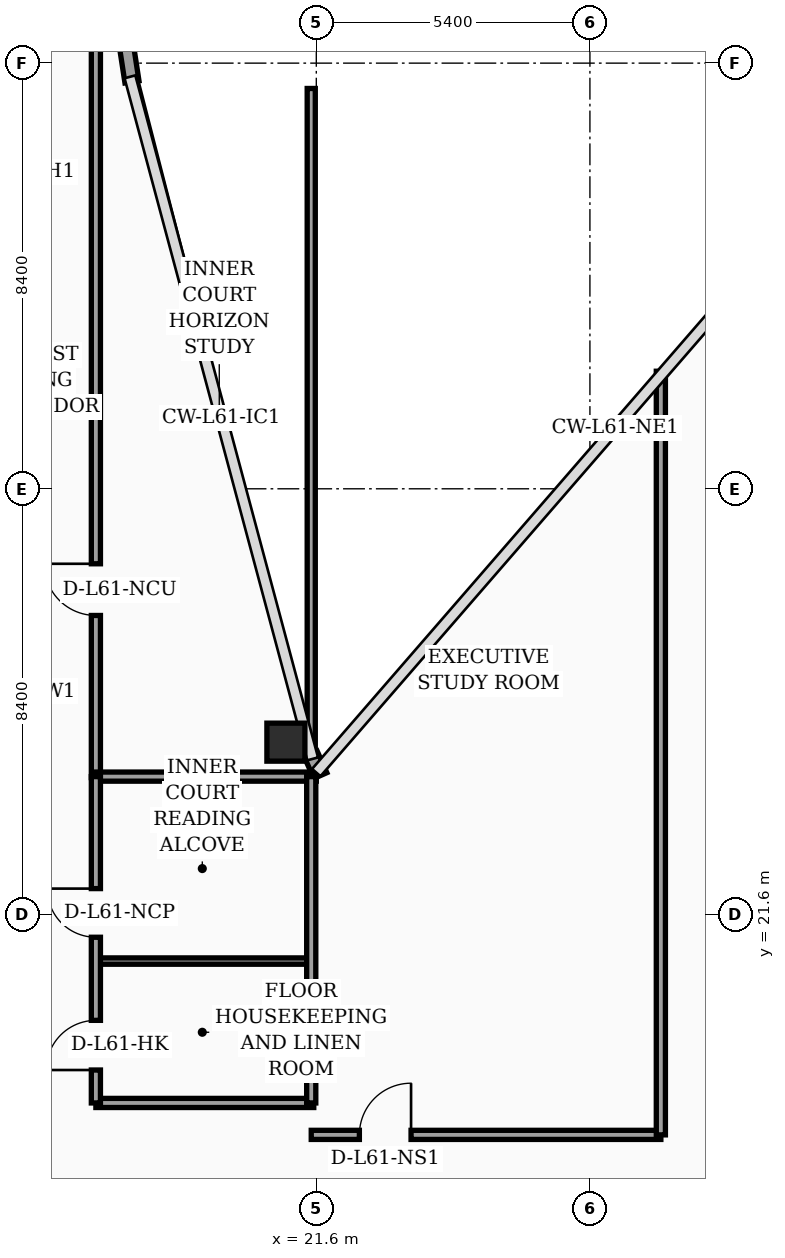
"""IFC4 building model, lengths in metres.
Left out: names, types, materials, properties, quantities, classifications, styles, units other than length and angle.
Written with IfcOpenShell. Run it as: python <this file> out.ifc"""

import sys

from ifc_helpers import new_model, si_unit, direction, frame, frame_2d, origin, origin_2d, place, context, subcontext, project, spatial, rectangle, hollow_rectangle, extrude, element, fill, save


model = new_model("IFC4")
c1 = context("Model", 3, precision=1e-05, world=origin(), true_north=direction((0.0, 1.0)))
c2 = subcontext(c1, "Body", "Model", "MODEL_VIEW")
j1 = project(units=[si_unit("LENGTHUNIT", "METRE"), si_unit("PLANEANGLEUNIT", "RADIAN")], contexts=[c1])
p1 = place(None, origin())
s1 = spatial("IfcSite", under=j1, at=p1, CompositionType="ELEMENT")
p2 = place(p1, origin())
s2 = spatial("IfcBuilding", under=s1, at=p2, CompositionType="ELEMENT")
p3 = place(p2, frame((0.0, 0.0, 247.6)))
s3 = spatial("IfcBuildingStorey", under=s2, at=p3, CompositionType="ELEMENT", Elevation=247.6)
p4 = place(p3, frame((21.0, 25.0, 0.0), z_axis=(0.0, 0.0, 1.0), x_axis=(1.0, 0.0, 0.0)))
e1 = element("IfcColumn", 1, at=p4, inside=s3, PredefinedType="COLUMN", context=c2, shape_type="SweptSolid", body=[
    extrude(hollow_rectangle(XDim=0.75, YDim=0.75, WallThickness=0.032, at=origin_2d()), origin(), (0.0, 0.0, 1.0), 3.56),
])
p5 = place(p3, frame((21.68, 24.34, 0.0), z_axis=(0.0, 0.0, 1.0), x_axis=(-0.40758134973, 0.913168901875, 0.0)))
e2 = element("IfcWall", 2, at=p5, inside=s3, PredefinedType="SOLIDWALL", context=c2, shape_type="SweptSolid", body=[
    extrude(rectangle(XDim=0.471, YDim=0.28, at=frame_2d((0.235, 0.0))), origin(), (0.0, 0.0, 1.0), 3.56),
])
p6 = place(p3, frame((17.962, 38.03, 0.0), z_axis=(0.0, 0.0, 1.0), x_axis=(-0.15141125477, 0.988470855377, 0.0)))
e3 = element("IfcWall", 3, at=p6, inside=s3, PredefinedType="SOLIDWALL", context=c2, shape_type="SweptSolid", body=[
    extrude(rectangle(XDim=0.739, YDim=0.28, at=frame_2d((0.369, 0.0))), origin(), (0.0, 0.0, 1.0), 3.56),
])
p7 = place(p3, frame((17.25, 24.3, 0.0), z_axis=(0.0, 0.0, 1.0), x_axis=(0.0, 1.0, 0.0)))
e4 = element("IfcWall", 4, at=p7, inside=s3, PredefinedType="PARTITIONING", context=c2, shape_type="SweptSolid", body=[
    extrude(rectangle(XDim=18.15, YDim=0.18, at=frame_2d((9.075, 0.0))), origin(), (0.0, 0.0, 1.0), 2.99),
])
p8 = place(p7, frame((3.2, 0.0, 0.0)))
e5 = element("IfcOpeningElement", 5, at=p8, cuts=e4, PredefinedType="OPENING", context=c2, shape_type="SweptSolid", body=[
    extrude(rectangle(XDim=1.02, YDim=2.2, at=frame_2d((0.51, 1.1))), frame((0.0, 0.1, 0.0), z_axis=(0.0, -1.0, 0.0), x_axis=(1.0, 0.0, 0.0)), (0.0, 0.0, 1.0), 0.2),
])
p9 = place(p3, frame((17.25, 17.88, 0.0), z_axis=(0.0, 0.0, 1.0), x_axis=(1.0, 0.0, 0.0)))
e6 = element("IfcWall", 6, at=p9, inside=s3, PredefinedType="PARTITIONING", context=c2, shape_type="SweptSolid", body=[
    extrude(rectangle(XDim=4.3, YDim=0.18, at=frame_2d((2.15, 0.0))), origin(), (0.0, 0.0, 1.0), 3.09),
])
p10 = place(p3, frame((17.25, 20.68, 0.0), z_axis=(0.0, 0.0, 1.0), x_axis=(1.0, 0.0, 0.0)))
e7 = element("IfcWall", 7, at=p10, inside=s3, PredefinedType="PARTITIONING", context=c2, shape_type="SweptSolid", body=[
    extrude(rectangle(XDim=4.3, YDim=0.125, at=frame_2d((2.15, 0.0))), origin(), (0.0, 0.0, 1.0), 3.56),
])
p11 = place(p3, frame((17.25, 24.32, 0.0), z_axis=(0.0, 0.0, 1.0), x_axis=(1.0, 0.0, 0.0)))
e8 = element("IfcWall", 8, at=p11, inside=s3, PredefinedType="PARTITIONING", context=c2, shape_type="SweptSolid", body=[
    extrude(rectangle(XDim=4.35, YDim=0.18, at=frame_2d((2.175, 0.0))), origin(), (0.0, 0.0, 1.0), 3.56),
])
p12 = place(p3, frame((21.5, 17.88, 0.0), z_axis=(0.0, 0.0, 1.0), x_axis=(0.0, 1.0, 0.0)))
e9 = element("IfcWall", 9, at=p12, inside=s3, PredefinedType="PARTITIONING", context=c2, shape_type="SweptSolid", body=[
    extrude(rectangle(XDim=6.44, YDim=0.18, at=frame_2d((3.22, 0.0))), origin(), (0.0, 0.0, 1.0), 3.09),
])
p13 = place(p3, frame((17.25, 17.88, 0.0), z_axis=(0.0, 0.0, 1.0), x_axis=(0.0, 1.0, 0.0)))
e10 = element("IfcWall", 10, at=p13, inside=s3, PredefinedType="PARTITIONING", context=c2, shape_type="SweptSolid", body=[
    extrude(rectangle(XDim=6.44, YDim=0.18, at=frame_2d((3.22, 0.0))), origin(), (0.0, 0.0, 1.0), 3.09),
])
p14 = place(p13, frame((0.65, 0.0, 0.0)))
e11 = element("IfcOpeningElement", 11, at=p14, cuts=e10, PredefinedType="OPENING", context=c2, shape_type="SweptSolid", body=[
    extrude(rectangle(XDim=0.98, YDim=2.15, at=frame_2d((0.49, 1.075))), frame((0.0, 0.1, 0.0), z_axis=(0.0, -1.0, 0.0), x_axis=(1.0, 0.0, 0.0)), (0.0, 0.0, 1.0), 0.2),
])
p15 = place(p13, frame((3.27, 0.0, 0.0)))
e12 = element("IfcOpeningElement", 12, at=p15, cuts=e10, PredefinedType="OPENING", context=c2, shape_type="SweptSolid", body=[
    extrude(rectangle(XDim=0.96, YDim=2.2, at=frame_2d((0.48, 1.1))), frame((0.0, 0.1, 0.0), z_axis=(0.0, -1.0, 0.0), x_axis=(1.0, 0.0, 0.0)), (0.0, 0.0, 1.0), 0.2),
])
p16 = place(p3, frame((21.5, 24.85, 0.0), z_axis=(0.0, 0.0, 1.0), x_axis=(0.0, 1.0, 0.0)))
e13 = element("IfcWall", 13, at=p16, inside=s3, PredefinedType="PARTITIONING", context=c2, shape_type="SweptSolid", body=[
    extrude(rectangle(XDim=13.05, YDim=0.16, at=frame_2d((6.525, 0.0))), origin(), (0.0, 0.0, 1.0), 2.99),
])
p17 = place(p3, frame((21.5, 17.25, 0.0), z_axis=(0.0, 0.0, 1.0), x_axis=(1.0, 0.0, 0.0)))
e14 = element("IfcWall", 14, at=p17, inside=s3, PredefinedType="PARTITIONING", context=c2, shape_type="SweptSolid", body=[
    extrude(rectangle(XDim=6.9, YDim=0.18, at=frame_2d((3.45, 0.0))), origin(), (0.0, 0.0, 1.0), 2.99),
])
p18 = place(p17, frame((0.95, 0.0, 0.0)))
e15 = element("IfcOpeningElement", 15, at=p18, cuts=e14, PredefinedType="OPENING", context=c2, shape_type="SweptSolid", body=[
    extrude(rectangle(XDim=1.02, YDim=2.2, at=frame_2d((0.51, 1.1))), frame((0.0, 0.1, 0.0), z_axis=(0.0, -1.0, 0.0), x_axis=(1.0, 0.0, 0.0)), (0.0, 0.0, 1.0), 0.2),
])
p19 = place(p3, frame((28.4, 17.25, 0.0), z_axis=(0.0, 0.0, 1.0), x_axis=(0.0, 1.0, 0.0)))
e16 = element("IfcWall", 16, at=p19, inside=s3, PredefinedType="PARTITIONING", context=c2, shape_type="SweptSolid", body=[
    extrude(rectangle(XDim=15.07, YDim=0.18, at=frame_2d((7.535, 0.0))), origin(), (0.0, 0.0, 1.0), 2.99),
])
p20 = place(p8, origin())
e17 = element("IfcDoor", 17, at=p20, inside=s3, OperationType="SINGLE_SWING_RIGHT", PredefinedType="DOOR", context=c2, shape_type="SweptSolid", body=[
    extrude(rectangle(XDim=1.02, YDim=2.2, at=frame_2d((0.51, 1.1))), frame((0.0, 0.025, 0.0), z_axis=(0.0, -1.0, 0.0), x_axis=(1.0, 0.0, 0.0)), (0.0, 0.0, 1.0), 0.05),
])
fill(e5, e17)
p21 = place(p14, origin())
e18 = element("IfcDoor", 18, at=p21, inside=s3, OperationType="SINGLE_SWING_LEFT", PredefinedType="DOOR", context=c2, shape_type="SweptSolid", body=[
    extrude(rectangle(XDim=0.98, YDim=2.15, at=frame_2d((0.49, 1.075))), frame((0.0, 0.025, 0.0), z_axis=(0.0, -1.0, 0.0), x_axis=(1.0, 0.0, 0.0)), (0.0, 0.0, 1.0), 0.05),
])
fill(e11, e18)
p22 = place(p15, origin())
e19 = element("IfcDoor", 19, at=p22, inside=s3, OperationType="SINGLE_SWING_RIGHT", PredefinedType="DOOR", context=c2, shape_type="SweptSolid", body=[
    extrude(rectangle(XDim=0.96, YDim=2.2, at=frame_2d((0.48, 1.1))), frame((0.0, 0.025, 0.0), z_axis=(0.0, -1.0, 0.0), x_axis=(1.0, 0.0, 0.0)), (0.0, 0.0, 1.0), 0.05),
])
fill(e12, e19)
p23 = place(p18, origin())
e20 = element("IfcDoor", 20, at=p23, inside=s3, OperationType="SINGLE_SWING_RIGHT", PredefinedType="DOOR", context=c2, shape_type="SweptSolid", body=[
    extrude(rectangle(XDim=1.02, YDim=2.2, at=frame_2d((0.51, 1.1))), frame((0.0, 0.025, 0.0), z_axis=(0.0, -1.0, 0.0), x_axis=(1.0, 0.0, 0.0)), (0.0, 0.0, 1.0), 0.05),
])
fill(e15, e20)
save(model, sys.argv[1])
